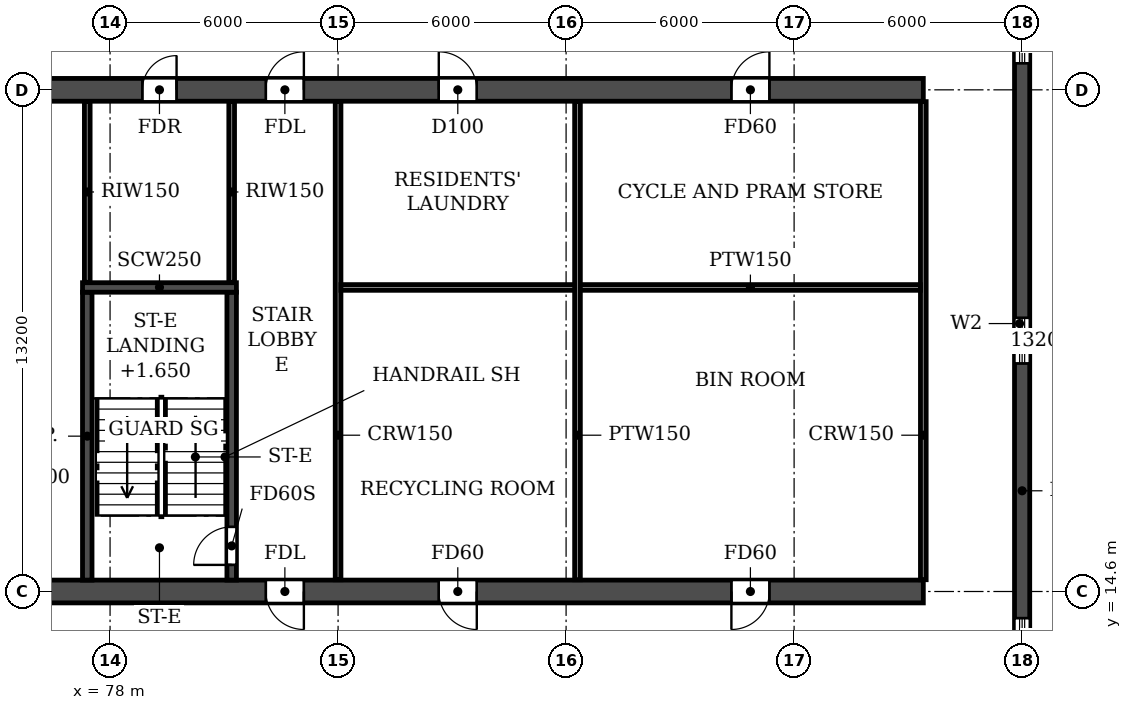
"""IFC4 building model, lengths in metres.
Left out: names, types, materials, properties, quantities, classifications, styles, units other than length and angle.
Written with IfcOpenShell. Run it as: python <this file> out.ifc"""

import sys

from ifc_helpers import new_model, si_unit, direction, frame, frame_2d, origin, place, context, subcontext, project, spatial, rectangle, extrude, element, fill, save


model = new_model("IFC4")
c1 = context("Model", 3, precision=1e-05, world=origin(), true_north=direction((0.0, 1.0)))
c2 = subcontext(c1, "Body", "Model", "MODEL_VIEW")
j1 = project(units=[si_unit("LENGTHUNIT", "METRE"), si_unit("PLANEANGLEUNIT", "RADIAN")], contexts=[c1])
p1 = place(None, origin())
s1 = spatial("IfcSite", under=j1, at=p1, CompositionType="ELEMENT")
p2 = place(p1, origin())
s2 = spatial("IfcBuilding", under=s1, at=p2, CompositionType="ELEMENT")
p3 = place(p2, frame((0.0, 0.0, 43.2)))
s3 = spatial("IfcBuildingStorey", under=s2, at=p3, CompositionType="ELEMENT", Elevation=43.2)
p4 = place(p3, frame((102.0, 4.683, 0.0), z_axis=(0.0, 0.0, 1.0), x_axis=(0.0, 1.0, 0.0)))
e1 = element("IfcWall", 1, at=p4, inside=s3, PredefinedType="SHEAR", context=c2, shape_type="SweptSolid", body=[
    extrude(rectangle(XDim=35.434, YDim=0.4, at=frame_2d((17.717, 0.0))), origin(), (0.0, 0.0, 1.0), 3.05),
])
p5 = place(p4, frame((15.917, 0.0, 0.9)))
e2 = element("IfcOpeningElement", 2, at=p5, cuts=e1, PredefinedType="OPENING", context=c2, shape_type="SweptSolid", body=[
    extrude(rectangle(XDim=1.2, YDim=1.5, at=frame_2d((0.6, 0.75))), frame((0.0, 0.21, 0.0), z_axis=(0.0, -1.0, 0.0), x_axis=(1.0, 0.0, 0.0)), (0.0, 0.0, 1.0), 0.42),
])
p6 = place(p4, frame((23.817, 0.0, 0.9)))
e3 = element("IfcOpeningElement", 3, at=p6, cuts=e1, PredefinedType="OPENING", context=c2, shape_type="SweptSolid", body=[
    extrude(rectangle(XDim=1.2, YDim=1.5, at=frame_2d((0.6, 0.75))), frame((0.0, 0.21, 0.0), z_axis=(0.0, -1.0, 0.0), x_axis=(1.0, 0.0, 0.0)), (0.0, 0.0, 1.0), 0.42),
])
p7 = place(p4, frame((8.017, 0.0, 0.9)))
e4 = element("IfcOpeningElement", 4, at=p7, cuts=e1, PredefinedType="OPENING", context=c2, shape_type="SweptSolid", body=[
    extrude(rectangle(XDim=1.2, YDim=1.5, at=frame_2d((0.6, 0.75))), frame((0.0, 0.21, 0.0), z_axis=(0.0, -1.0, 0.0), x_axis=(1.0, 0.0, 0.0)), (0.0, 0.0, 1.0), 0.42),
])
p8 = place(p4, frame((29.493, 0.0, 0.6)))
e5 = element("IfcOpeningElement", 5, at=p8, cuts=e1, PredefinedType="OPENING", context=c2, shape_type="SweptSolid", body=[
    extrude(rectangle(XDim=2.2, YDim=1.8, at=frame_2d((1.1, 0.9))), frame((0.0, 0.21, 0.0), z_axis=(0.0, -1.0, 0.0), x_axis=(1.0, 0.0, 0.0)), (0.0, 0.0, 1.0), 0.42),
])
p9 = place(p4, frame((2.541, 0.0, 0.6)))
e6 = element("IfcOpeningElement", 6, at=p9, cuts=e1, PredefinedType="OPENING", context=c2, shape_type="SweptSolid", body=[
    extrude(rectangle(XDim=2.2, YDim=1.8, at=frame_2d((1.1, 0.9))), frame((0.0, 0.21, 0.0), z_axis=(0.0, -1.0, 0.0), x_axis=(1.0, 0.0, 0.0)), (0.0, 0.0, 1.0), 0.42),
])
p10 = place(p3, frame((2.6, 14.6, 0.0), z_axis=(0.0, 0.0, 1.0), x_axis=(1.0, 0.0, 0.0)))
e7 = element("IfcWall", 7, at=p10, inside=s3, PredefinedType="SOLIDWALL", context=c2, shape_type="SweptSolid", body=[
    extrude(rectangle(XDim=96.8, YDim=0.6, at=frame_2d((48.4, 0.0))), origin(), (0.0, 0.0, 1.0), 3.05),
])
p11 = place(p10, frame((3.05, 0.0, 0.0)))
e8 = element("IfcOpeningElement", 8, at=p11, cuts=e7, PredefinedType="OPENING", context=c2, shape_type="SweptSolid", body=[
    extrude(rectangle(XDim=1.5, YDim=2.1, at=frame_2d((0.75, 1.05))), frame((0.0, 0.31, 0.0), z_axis=(0.0, -1.0, 0.0), x_axis=(1.0, 0.0, 0.0)), (0.0, 0.0, 1.0), 0.62),
])
p12 = place(p10, frame((10.75, 0.0, 0.0)))
e9 = element("IfcOpeningElement", 9, at=p12, cuts=e7, PredefinedType="OPENING", context=c2, shape_type="SweptSolid", body=[
    extrude(rectangle(XDim=1.5, YDim=2.1, at=frame_2d((0.75, 1.05))), frame((0.0, 0.31, 0.0), z_axis=(0.0, -1.0, 0.0), x_axis=(1.0, 0.0, 0.0)), (0.0, 0.0, 1.0), 0.62),
])
p13 = place(p10, frame((16.3, 0.0, 0.0)))
e10 = element("IfcOpeningElement", 10, at=p13, cuts=e7, PredefinedType="OPENING", context=c2, shape_type="SweptSolid", body=[
    extrude(rectangle(XDim=1.0, YDim=2.1, at=frame_2d((0.5, 1.05))), frame((0.0, 0.31, 0.0), z_axis=(0.0, -1.0, 0.0), x_axis=(1.0, 0.0, 0.0)), (0.0, 0.0, 1.0), 0.62),
])
p14 = place(p10, frame((24.2, 0.0, 0.0)))
e11 = element("IfcOpeningElement", 11, at=p14, cuts=e7, PredefinedType="OPENING", context=c2, shape_type="SweptSolid", body=[
    extrude(rectangle(XDim=1.0, YDim=2.1, at=frame_2d((0.5, 1.05))), frame((0.0, 0.31, 0.0), z_axis=(0.0, -1.0, 0.0), x_axis=(1.0, 0.0, 0.0)), (0.0, 0.0, 1.0), 0.62),
])
p15 = place(p10, frame((28.8, 0.0, 0.0)))
e12 = element("IfcOpeningElement", 12, at=p15, cuts=e7, PredefinedType="OPENING", context=c2, shape_type="SweptSolid", body=[
    extrude(rectangle(XDim=1.0, YDim=2.1, at=frame_2d((0.5, 1.05))), frame((0.0, 0.31, 0.0), z_axis=(0.0, -1.0, 0.0), x_axis=(1.0, 0.0, 0.0)), (0.0, 0.0, 1.0), 0.62),
])
p16 = place(p10, frame((42.7, 0.0, 0.0)))
e13 = element("IfcOpeningElement", 13, at=p16, cuts=e7, PredefinedType="OPENING", context=c2, shape_type="SweptSolid", body=[
    extrude(rectangle(XDim=1.0, YDim=2.1, at=frame_2d((0.5, 1.05))), frame((0.0, 0.31, 0.0), z_axis=(0.0, -1.0, 0.0), x_axis=(1.0, 0.0, 0.0)), (0.0, 0.0, 1.0), 0.62),
])
p17 = place(p10, frame((47.9, 0.0, 0.0)))
e14 = element("IfcOpeningElement", 14, at=p17, cuts=e7, PredefinedType="OPENING", context=c2, shape_type="SweptSolid", body=[
    extrude(rectangle(XDim=1.0, YDim=2.1, at=frame_2d((0.5, 1.05))), frame((0.0, 0.31, 0.0), z_axis=(0.0, -1.0, 0.0), x_axis=(1.0, 0.0, 0.0)), (0.0, 0.0, 1.0), 0.62),
])
p18 = place(p10, frame((51.8, 0.0, 0.0)))
e15 = element("IfcOpeningElement", 15, at=p18, cuts=e7, PredefinedType="OPENING", context=c2, shape_type="SweptSolid", body=[
    extrude(rectangle(XDim=1.0, YDim=2.1, at=frame_2d((0.5, 1.05))), frame((0.0, 0.31, 0.0), z_axis=(0.0, -1.0, 0.0), x_axis=(1.0, 0.0, 0.0)), (0.0, 0.0, 1.0), 0.62),
])
p19 = place(p10, frame((55.7, 0.0, 0.0)))
e16 = element("IfcOpeningElement", 16, at=p19, cuts=e7, PredefinedType="OPENING", context=c2, shape_type="SweptSolid", body=[
    extrude(rectangle(XDim=1.0, YDim=2.1, at=frame_2d((0.5, 1.05))), frame((0.0, 0.31, 0.0), z_axis=(0.0, -1.0, 0.0), x_axis=(1.0, 0.0, 0.0)), (0.0, 0.0, 1.0), 0.62),
])
p20 = place(p10, frame((67.0, 0.0, 0.0)))
e17 = element("IfcOpeningElement", 17, at=p20, cuts=e7, PredefinedType="OPENING", context=c2, shape_type="SweptSolid", body=[
    extrude(rectangle(XDim=1.0, YDim=2.1, at=frame_2d((0.5, 1.05))), frame((0.0, 0.31, 0.0), z_axis=(0.0, -1.0, 0.0), x_axis=(1.0, 0.0, 0.0)), (0.0, 0.0, 1.0), 0.62),
])
p21 = place(p10, frame((71.6, 0.0, 0.0)))
e18 = element("IfcOpeningElement", 18, at=p21, cuts=e7, PredefinedType="OPENING", context=c2, shape_type="SweptSolid", body=[
    extrude(rectangle(XDim=1.0, YDim=2.1, at=frame_2d((0.5, 1.05))), frame((0.0, 0.31, 0.0), z_axis=(0.0, -1.0, 0.0), x_axis=(1.0, 0.0, 0.0)), (0.0, 0.0, 1.0), 0.62),
])
p22 = place(p10, frame((79.5, 0.0, 0.0)))
e19 = element("IfcOpeningElement", 19, at=p22, cuts=e7, PredefinedType="OPENING", context=c2, shape_type="SweptSolid", body=[
    extrude(rectangle(XDim=1.0, YDim=2.1, at=frame_2d((0.5, 1.05))), frame((0.0, 0.31, 0.0), z_axis=(0.0, -1.0, 0.0), x_axis=(1.0, 0.0, 0.0)), (0.0, 0.0, 1.0), 0.62),
])
p23 = place(p10, frame((84.05, 0.0, 0.0)))
e20 = element("IfcOpeningElement", 20, at=p23, cuts=e7, PredefinedType="OPENING", context=c2, shape_type="SweptSolid", body=[
    extrude(rectangle(XDim=1.0, YDim=2.1, at=frame_2d((0.5, 1.05))), frame((0.0, 0.31, 0.0), z_axis=(0.0, -1.0, 0.0), x_axis=(1.0, 0.0, 0.0)), (0.0, 0.0, 1.0), 0.62),
])
p24 = place(p10, frame((91.75, 0.0, 0.0)))
e21 = element("IfcOpeningElement", 21, at=p24, cuts=e7, PredefinedType="OPENING", context=c2, shape_type="SweptSolid", body=[
    extrude(rectangle(XDim=1.0, YDim=2.1, at=frame_2d((0.5, 1.05))), frame((0.0, 0.31, 0.0), z_axis=(0.0, -1.0, 0.0), x_axis=(1.0, 0.0, 0.0)), (0.0, 0.0, 1.0), 0.62),
])
p25 = place(p3, frame((2.6, 27.8, 0.0), z_axis=(0.0, 0.0, 1.0), x_axis=(1.0, 0.0, 0.0)))
e22 = element("IfcWall", 22, at=p25, inside=s3, PredefinedType="SOLIDWALL", context=c2, shape_type="SweptSolid", body=[
    extrude(rectangle(XDim=96.8, YDim=0.6, at=frame_2d((48.4, 0.0))), origin(), (0.0, 0.0, 1.0), 3.05),
])
p26 = place(p25, frame((7.2, 0.0, 0.0)))
e23 = element("IfcOpeningElement", 23, at=p26, cuts=e22, PredefinedType="OPENING", context=c2, shape_type="SweptSolid", body=[
    extrude(rectangle(XDim=1.0, YDim=2.1, at=frame_2d((0.5, 1.05))), frame((0.0, 0.31, 0.0), z_axis=(0.0, -1.0, 0.0), x_axis=(1.0, 0.0, 0.0)), (0.0, 0.0, 1.0), 0.62),
])
p27 = place(p25, frame((16.3, 0.0, 0.0)))
e24 = element("IfcOpeningElement", 24, at=p27, cuts=e22, PredefinedType="OPENING", context=c2, shape_type="SweptSolid", body=[
    extrude(rectangle(XDim=1.0, YDim=2.1, at=frame_2d((0.5, 1.05))), frame((0.0, 0.31, 0.0), z_axis=(0.0, -1.0, 0.0), x_axis=(1.0, 0.0, 0.0)), (0.0, 0.0, 1.0), 0.62),
])
p28 = place(p25, frame((19.65, 0.0, 0.0)))
e25 = element("IfcOpeningElement", 25, at=p28, cuts=e22, PredefinedType="OPENING", context=c2, shape_type="SweptSolid", body=[
    extrude(rectangle(XDim=0.9, YDim=2.1, at=frame_2d((0.45, 1.05))), frame((0.0, 0.31, 0.0), z_axis=(0.0, -1.0, 0.0), x_axis=(1.0, 0.0, 0.0)), (0.0, 0.0, 1.0), 0.62),
])
p29 = place(p25, frame((28.85, 0.0, 0.0)))
e26 = element("IfcOpeningElement", 26, at=p29, cuts=e22, PredefinedType="OPENING", context=c2, shape_type="SweptSolid", body=[
    extrude(rectangle(XDim=0.9, YDim=2.1, at=frame_2d((0.45, 1.05))), frame((0.0, 0.31, 0.0), z_axis=(0.0, -1.0, 0.0), x_axis=(1.0, 0.0, 0.0)), (0.0, 0.0, 1.0), 0.62),
])
p30 = place(p25, frame((33.3, 0.0, 0.0)))
e27 = element("IfcOpeningElement", 27, at=p30, cuts=e22, PredefinedType="OPENING", context=c2, shape_type="SweptSolid", body=[
    extrude(rectangle(XDim=1.0, YDim=2.1, at=frame_2d((0.5, 1.05))), frame((0.0, 0.31, 0.0), z_axis=(0.0, -1.0, 0.0), x_axis=(1.0, 0.0, 0.0)), (0.0, 0.0, 1.0), 0.62),
])
p31 = place(p25, frame((38.25, 0.0, 0.0)))
e28 = element("IfcOpeningElement", 28, at=p31, cuts=e22, PredefinedType="OPENING", context=c2, shape_type="SweptSolid", body=[
    extrude(rectangle(XDim=1.5, YDim=2.1, at=frame_2d((0.75, 1.05))), frame((0.0, 0.31, 0.0), z_axis=(0.0, -1.0, 0.0), x_axis=(1.0, 0.0, 0.0)), (0.0, 0.0, 1.0), 0.62),
])
p32 = place(p25, frame((45.0, 0.0, 0.0)))
e29 = element("IfcOpeningElement", 29, at=p32, cuts=e22, PredefinedType="OPENING", context=c2, shape_type="SweptSolid", body=[
    extrude(rectangle(XDim=1.0, YDim=2.1, at=frame_2d((0.5, 1.05))), frame((0.0, 0.31, 0.0), z_axis=(0.0, -1.0, 0.0), x_axis=(1.0, 0.0, 0.0)), (0.0, 0.0, 1.0), 0.62),
])
p33 = place(p25, frame((47.9, 0.0, 0.0)))
e30 = element("IfcOpeningElement", 30, at=p33, cuts=e22, PredefinedType="OPENING", context=c2, shape_type="SweptSolid", body=[
    extrude(rectangle(XDim=1.0, YDim=2.1, at=frame_2d((0.5, 1.05))), frame((0.0, 0.31, 0.0), z_axis=(0.0, -1.0, 0.0), x_axis=(1.0, 0.0, 0.0)), (0.0, 0.0, 1.0), 0.62),
])
p34 = place(p25, frame((52.1, 0.0, 0.0)))
e31 = element("IfcOpeningElement", 31, at=p34, cuts=e22, PredefinedType="OPENING", context=c2, shape_type="SweptSolid", body=[
    extrude(rectangle(XDim=1.0, YDim=2.1, at=frame_2d((0.5, 1.05))), frame((0.0, 0.31, 0.0), z_axis=(0.0, -1.0, 0.0), x_axis=(1.0, 0.0, 0.0)), (0.0, 0.0, 1.0), 0.62),
])
p35 = place(p25, frame((56.0, 0.0, 0.0)))
e32 = element("IfcOpeningElement", 32, at=p35, cuts=e22, PredefinedType="OPENING", context=c2, shape_type="SweptSolid", body=[
    extrude(rectangle(XDim=1.0, YDim=2.1, at=frame_2d((0.5, 1.05))), frame((0.0, 0.31, 0.0), z_axis=(0.0, -1.0, 0.0), x_axis=(1.0, 0.0, 0.0)), (0.0, 0.0, 1.0), 0.62),
])
p36 = place(p25, frame((61.2, 0.0, 0.0)))
e33 = element("IfcOpeningElement", 33, at=p36, cuts=e22, PredefinedType="OPENING", context=c2, shape_type="SweptSolid", body=[
    extrude(rectangle(XDim=1.0, YDim=2.1, at=frame_2d((0.5, 1.05))), frame((0.0, 0.31, 0.0), z_axis=(0.0, -1.0, 0.0), x_axis=(1.0, 0.0, 0.0)), (0.0, 0.0, 1.0), 0.62),
])
p37 = place(p25, frame((67.05, 0.0, 0.0)))
e34 = element("IfcOpeningElement", 34, at=p37, cuts=e22, PredefinedType="OPENING", context=c2, shape_type="SweptSolid", body=[
    extrude(rectangle(XDim=0.9, YDim=2.1, at=frame_2d((0.45, 1.05))), frame((0.0, 0.31, 0.0), z_axis=(0.0, -1.0, 0.0), x_axis=(1.0, 0.0, 0.0)), (0.0, 0.0, 1.0), 0.62),
])
p38 = place(p25, frame((76.25, 0.0, 0.0)))
e35 = element("IfcOpeningElement", 35, at=p38, cuts=e22, PredefinedType="OPENING", context=c2, shape_type="SweptSolid", body=[
    extrude(rectangle(XDim=0.9, YDim=2.1, at=frame_2d((0.45, 1.05))), frame((0.0, 0.31, 0.0), z_axis=(0.0, -1.0, 0.0), x_axis=(1.0, 0.0, 0.0)), (0.0, 0.0, 1.0), 0.62),
])
p39 = place(p25, frame((79.5, 0.0, 0.0)))
e36 = element("IfcOpeningElement", 36, at=p39, cuts=e22, PredefinedType="OPENING", context=c2, shape_type="SweptSolid", body=[
    extrude(rectangle(XDim=1.0, YDim=2.1, at=frame_2d((0.5, 1.05))), frame((0.0, 0.31, 0.0), z_axis=(0.0, -1.0, 0.0), x_axis=(1.0, 0.0, 0.0)), (0.0, 0.0, 1.0), 0.62),
])
p40 = place(p25, frame((84.05, 0.0, 0.0)))
e37 = element("IfcOpeningElement", 37, at=p40, cuts=e22, PredefinedType="OPENING", context=c2, shape_type="SweptSolid", body=[
    extrude(rectangle(XDim=1.0, YDim=2.1, at=frame_2d((0.5, 1.05))), frame((0.0, 0.31, 0.0), z_axis=(0.0, -1.0, 0.0), x_axis=(1.0, 0.0, 0.0)), (0.0, 0.0, 1.0), 0.62),
])
p41 = place(p25, frame((91.75, 0.0, 0.0)))
e38 = element("IfcOpeningElement", 38, at=p41, cuts=e22, PredefinedType="OPENING", context=c2, shape_type="SweptSolid", body=[
    extrude(rectangle(XDim=1.0, YDim=2.1, at=frame_2d((0.5, 1.05))), frame((0.0, 0.31, 0.0), z_axis=(0.0, -1.0, 0.0), x_axis=(1.0, 0.0, 0.0)), (0.0, 0.0, 1.0), 0.62),
])
p42 = place(p3, frame((77.4, 14.9, 0.0), z_axis=(0.0, 0.0, 1.0), x_axis=(0.0, 1.0, 0.0)))
e39 = element("IfcWall", 39, at=p42, inside=s3, PredefinedType="SOLIDWALL", context=c2, shape_type="SweptSolid", body=[
    extrude(rectangle(XDim=7.575, YDim=0.25, at=frame_2d((3.788, 0.0))), origin(), (0.0, 0.0, 1.0), 3.05),
])
p43 = place(p3, frame((81.2, 14.9, 0.0), z_axis=(0.0, 0.0, 1.0), x_axis=(0.0, 1.0, 0.0)))
e40 = element("IfcWall", 40, at=p43, inside=s3, PredefinedType="SOLIDWALL", context=c2, shape_type="SweptSolid", body=[
    extrude(rectangle(XDim=7.575, YDim=0.25, at=frame_2d((3.788, 0.0))), origin(), (0.0, 0.0, 1.0), 3.05),
])
p44 = place(p43, frame((0.4, 0.0, 0.0)))
e41 = element("IfcOpeningElement", 41, at=p44, cuts=e40, PredefinedType="OPENING", context=c2, shape_type="SweptSolid", body=[
    extrude(rectangle(XDim=1.0, YDim=2.1, at=frame_2d((0.5, 1.05))), frame((0.0, 0.135, 0.0), z_axis=(0.0, -1.0, 0.0), x_axis=(1.0, 0.0, 0.0)), (0.0, 0.0, 1.0), 0.27),
])
p45 = place(p3, frame((77.275, 22.6, 0.0), z_axis=(0.0, 0.0, 1.0), x_axis=(1.0, 0.0, 0.0)))
e42 = element("IfcWall", 42, at=p45, inside=s3, PredefinedType="SOLIDWALL", context=c2, shape_type="SweptSolid", body=[
    extrude(rectangle(XDim=4.05, YDim=0.25, at=frame_2d((2.025, 0.0))), origin(), (0.0, 0.0, 1.0), 3.05),
])
for number, where, z_axis, x_axis in (
    (43, (84.0, 14.91, 0.0), (0.0, 0.0, 1.0), (0.0, 1.0, 0.0)),
    (44, (99.4, 14.91, 0.0), (0.0, 0.0, 1.0), (0.0, 1.0, 0.0)),
):
    element("IfcWall", number, at=place(p3, frame(where, z_axis=z_axis, x_axis=x_axis)), inside=s3, PredefinedType="PARTITIONING", context=c2, shape_type="SweptSolid", body=[
        extrude(rectangle(XDim=12.58, YDim=0.15, at=frame_2d((6.29, 0.0))), origin(), (0.0, 0.0, 1.0), 3.05),
    ])
p46 = place(p3, frame((84.075, 22.6, 0.0), z_axis=(0.0, 0.0, 1.0), x_axis=(1.0, 0.0, 0.0)))
e45 = element("IfcWall", 45, at=p46, inside=s3, PredefinedType="PARTITIONING", context=c2, shape_type="SweptSolid", body=[
    extrude(rectangle(XDim=15.25, YDim=0.15, at=frame_2d((7.625, 0.0))), origin(), (0.0, 0.0, 1.0), 3.05),
])
p47 = place(p3, frame((90.3, 14.91, 0.0), z_axis=(0.0, 0.0, 1.0), x_axis=(0.0, 1.0, 0.0)))
e46 = element("IfcWall", 46, at=p47, inside=s3, PredefinedType="PARTITIONING", context=c2, shape_type="SweptSolid", body=[
    extrude(rectangle(XDim=12.58, YDim=0.15, at=frame_2d((6.29, 0.0))), origin(), (0.0, 0.0, 1.0), 3.05),
])
for number, where, z_axis, x_axis in (
    (47, (77.4, 22.735, 0.0), (0.0, 0.0, 1.0), (0.0, 1.0, 0.0)),
    (48, (81.2, 22.735, 0.0), (0.0, 0.0, 1.0), (0.0, 1.0, 0.0)),
):
    element("IfcWall", number, at=place(p3, frame(where, z_axis=z_axis, x_axis=x_axis)), inside=s3, PredefinedType="PARTITIONING", context=c2, shape_type="SweptSolid", body=[
        extrude(rectangle(XDim=4.755, YDim=0.15, at=frame_2d((2.377, 0.0))), origin(), (0.0, 0.0, 1.0), 3.05),
    ])
p48 = place(p5, origin())
e49 = element("IfcWindow", 49, at=p48, inside=s3, PartitioningType="SINGLE_PANEL", PredefinedType="WINDOW", context=c2, shape_type="SweptSolid", body=[
    extrude(rectangle(XDim=1.2, YDim=1.5, at=frame_2d((0.6, 0.75))), frame((0.0, 0.03, 0.0), z_axis=(0.0, -1.0, 0.0), x_axis=(1.0, 0.0, 0.0)), (0.0, 0.0, 1.0), 0.06),
])
fill(e2, e49)
p49 = place(p6, origin())
e50 = element("IfcWindow", 50, at=p49, inside=s3, PartitioningType="SINGLE_PANEL", PredefinedType="WINDOW", context=c2, shape_type="SweptSolid", body=[
    extrude(rectangle(XDim=1.2, YDim=1.5, at=frame_2d((0.6, 0.75))), frame((0.0, 0.03, 0.0), z_axis=(0.0, -1.0, 0.0), x_axis=(1.0, 0.0, 0.0)), (0.0, 0.0, 1.0), 0.06),
])
fill(e3, e50)
p50 = place(p7, origin())
e51 = element("IfcWindow", 51, at=p50, inside=s3, PartitioningType="SINGLE_PANEL", PredefinedType="WINDOW", context=c2, shape_type="SweptSolid", body=[
    extrude(rectangle(XDim=1.2, YDim=1.5, at=frame_2d((0.6, 0.75))), frame((0.0, 0.03, 0.0), z_axis=(0.0, -1.0, 0.0), x_axis=(1.0, 0.0, 0.0)), (0.0, 0.0, 1.0), 0.06),
])
fill(e4, e51)
p51 = place(p38, origin())
e52 = element("IfcDoor", 52, at=p51, inside=s3, OperationType="SINGLE_SWING_RIGHT", PredefinedType="DOOR", context=c2, shape_type="SweptSolid", body=[
    extrude(rectangle(XDim=0.9, YDim=2.1, at=frame_2d((0.45, 1.05))), frame((0.0, 0.025, 0.0), z_axis=(0.0, -1.0, 0.0), x_axis=(1.0, 0.0, 0.0)), (0.0, 0.0, 1.0), 0.05),
])
fill(e35, e52)
p52 = place(p39, origin())
e53 = element("IfcDoor", 53, at=p52, inside=s3, OperationType="SINGLE_SWING_RIGHT", PredefinedType="DOOR", context=c2, shape_type="SweptSolid", body=[
    extrude(rectangle(XDim=1.0, YDim=2.1, at=frame_2d((0.5, 1.05))), frame((0.0, 0.025, 0.0), z_axis=(0.0, -1.0, 0.0), x_axis=(1.0, 0.0, 0.0)), (0.0, 0.0, 1.0), 0.05),
])
fill(e36, e53)
p53 = place(p40, origin())
e54 = element("IfcDoor", 54, at=p53, inside=s3, OperationType="SINGLE_SWING_LEFT", PredefinedType="DOOR", context=c2, shape_type="SweptSolid", body=[
    extrude(rectangle(XDim=1.0, YDim=2.1, at=frame_2d((0.5, 1.05))), frame((0.0, 0.025, 0.0), z_axis=(0.0, -1.0, 0.0), x_axis=(1.0, 0.0, 0.0)), (0.0, 0.0, 1.0), 0.05),
])
fill(e37, e54)
p54 = place(p41, origin())
e55 = element("IfcDoor", 55, at=p54, inside=s3, OperationType="SINGLE_SWING_RIGHT", PredefinedType="DOOR", context=c2, shape_type="SweptSolid", body=[
    extrude(rectangle(XDim=1.0, YDim=2.1, at=frame_2d((0.5, 1.05))), frame((0.0, 0.025, 0.0), z_axis=(0.0, -1.0, 0.0), x_axis=(1.0, 0.0, 0.0)), (0.0, 0.0, 1.0), 0.05),
])
fill(e38, e55)
p55 = place(p22, frame((1.0, 0.0, 0.0), z_axis=(0.0, 0.0, 1.0), x_axis=(-1.0, 0.0, 0.0)))
e56 = element("IfcDoor", 56, at=p55, inside=s3, OperationType="SINGLE_SWING_LEFT", PredefinedType="DOOR", context=c2, shape_type="SweptSolid", body=[
    extrude(rectangle(XDim=1.0, YDim=2.1, at=frame_2d((0.5, 1.05))), frame((0.0, 0.025, 0.0), z_axis=(0.0, -1.0, 0.0), x_axis=(1.0, 0.0, 0.0)), (0.0, 0.0, 1.0), 0.05),
])
fill(e19, e56)
p56 = place(p23, frame((1.0, 0.0, 0.0), z_axis=(0.0, 0.0, 1.0), x_axis=(-1.0, 0.0, 0.0)))
e57 = element("IfcDoor", 57, at=p56, inside=s3, OperationType="SINGLE_SWING_LEFT", PredefinedType="DOOR", context=c2, shape_type="SweptSolid", body=[
    extrude(rectangle(XDim=1.0, YDim=2.1, at=frame_2d((0.5, 1.05))), frame((0.0, 0.025, 0.0), z_axis=(0.0, -1.0, 0.0), x_axis=(1.0, 0.0, 0.0)), (0.0, 0.0, 1.0), 0.05),
])
fill(e20, e57)
p57 = place(p24, frame((1.0, 0.0, 0.0), z_axis=(0.0, 0.0, 1.0), x_axis=(-1.0, 0.0, 0.0)))
e58 = element("IfcDoor", 58, at=p57, inside=s3, OperationType="SINGLE_SWING_RIGHT", PredefinedType="DOOR", context=c2, shape_type="SweptSolid", body=[
    extrude(rectangle(XDim=1.0, YDim=2.1, at=frame_2d((0.5, 1.05))), frame((0.0, 0.025, 0.0), z_axis=(0.0, -1.0, 0.0), x_axis=(1.0, 0.0, 0.0)), (0.0, 0.0, 1.0), 0.05),
])
fill(e21, e58)
p58 = place(p44, origin())
e59 = element("IfcDoor", 59, at=p58, inside=s3, OperationType="SINGLE_SWING_LEFT", PredefinedType="DOOR", context=c2, shape_type="SweptSolid", body=[
    extrude(rectangle(XDim=1.0, YDim=2.1, at=frame_2d((0.5, 1.05))), frame((0.0, 0.025, 0.0), z_axis=(0.0, -1.0, 0.0), x_axis=(1.0, 0.0, 0.0)), (0.0, 0.0, 1.0), 0.05),
])
fill(e41, e59)
save(model, sys.argv[1])
